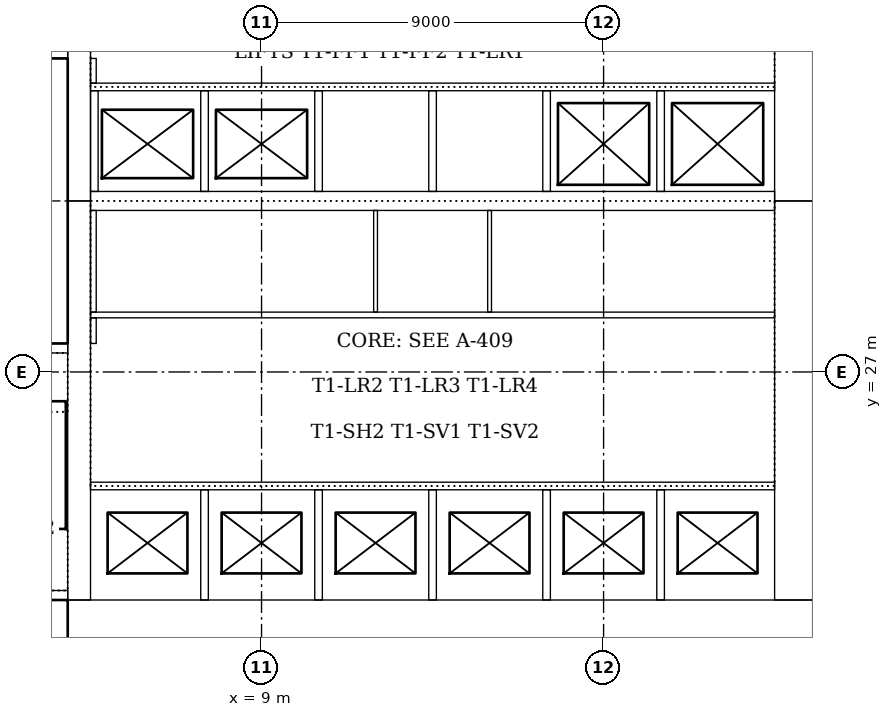
"""IFC4 building model, lengths in metres.
Left out: names, types, materials, properties, quantities, classifications, styles, units other than length and angle.
Written with IfcOpenShell. Run it as: python <this file> out.ifc"""

import sys

from ifc_helpers import new_model, si_unit, direction, frame, frame_2d, origin, place, context, subcontext, project, spatial, rectangle, extrude, element, fill, save


model = new_model("IFC4")
c1 = context("Model", 3, precision=1e-05, world=origin(), true_north=direction((0.0, 1.0)))
c2 = subcontext(c1, "Body", "Model", "MODEL_VIEW")
j1 = project(units=[si_unit("LENGTHUNIT", "METRE"), si_unit("PLANEANGLEUNIT", "RADIAN")], contexts=[c1])
p1 = place(None, origin())
s1 = spatial("IfcSite", under=j1, at=p1, CompositionType="ELEMENT")
p2 = place(p1, origin())
s2 = spatial("IfcBuilding", under=s1, at=p2, CompositionType="ELEMENT")
p3 = place(p2, frame((0.0, 0.0, 26.0)))
s3 = spatial("IfcBuildingStorey", under=s2, at=p3, CompositionType="ELEMENT", Elevation=26.0)
p4 = place(p3, frame((3.9, 20.5, 0.0), z_axis=(0.0, 0.0, 1.0), x_axis=(1.0, 0.0, 0.0)))
e1 = element("IfcWall", 1, at=p4, inside=s3, PredefinedType="SOLIDWALL", context=c2, shape_type="SweptSolid", body=[
    extrude(rectangle(XDim=19.6, YDim=1.0, at=frame_2d((9.8, 0.0))), origin(), (0.0, 0.0, 1.0), 4.0),
])
p5 = place(p3, frame((23.0, 21.0, 0.0), z_axis=(0.0, 0.0, 1.0), x_axis=(0.0, 1.0, 0.0)))
e2 = element("IfcWall", 2, at=p5, inside=s3, PredefinedType="SOLIDWALL", context=c2, shape_type="SweptSolid", body=[
    extrude(rectangle(XDim=10.5, YDim=1.0, at=frame_2d((5.25, 0.0))), origin(), (0.0, 0.0, 1.0), 4.0),
])
p6 = place(p5, frame((4.35, 0.0, 0.0)))
e3 = element("IfcOpeningElement", 3, at=p6, cuts=e2, PredefinedType="OPENING", context=c2, shape_type="SweptSolid", body=[
    extrude(rectangle(XDim=1.8, YDim=2.1, at=frame_2d((0.9, 1.05))), frame((0.0, 0.51, 0.0), z_axis=(0.0, -1.0, 0.0), x_axis=(1.0, 0.0, 0.0)), (0.0, 0.0, 1.0), 1.02),
])
p7 = place(p3, frame((23.0, 31.5, 0.0), z_axis=(0.0, 0.0, 1.0), x_axis=(0.0, 1.0, 0.0)))
e4 = element("IfcWall", 4, at=p7, inside=s3, PredefinedType="SOLIDWALL", context=c2, shape_type="SweptSolid", body=[
    extrude(rectangle(XDim=10.5, YDim=1.0, at=frame_2d((5.25, 0.0))), origin(), (0.0, 0.0, 1.0), 4.0),
])
p8 = place(p7, frame((3.15, 0.0, 0.0)))
e5 = element("IfcOpeningElement", 5, at=p8, cuts=e4, PredefinedType="OPENING", context=c2, shape_type="SweptSolid", body=[
    extrude(rectangle(XDim=1.0, YDim=2.1, at=frame_2d((0.5, 1.05))), frame((0.0, 0.51, 0.0), z_axis=(0.0, -1.0, 0.0), x_axis=(1.0, 0.0, 0.0)), (0.0, 0.0, 1.0), 1.02),
])
p9 = place(p7, frame((5.2, 0.0, 0.0)))
e6 = element("IfcOpeningElement", 6, at=p9, cuts=e4, PredefinedType="OPENING", context=c2, shape_type="SweptSolid", body=[
    extrude(rectangle(XDim=1.0, YDim=2.1, at=frame_2d((0.5, 1.05))), frame((0.0, 0.51, 0.0), z_axis=(0.0, -1.0, 0.0), x_axis=(1.0, 0.0, 0.0)), (0.0, 0.0, 1.0), 1.02),
])
p10 = place(p3, frame((4.2, 42.0, 0.0), z_axis=(0.0, 0.0, 1.0), x_axis=(0.0, -1.0, 0.0)))
e7 = element("IfcWall", 7, at=p10, inside=s3, PredefinedType="SOLIDWALL", context=c2, shape_type="SweptSolid", body=[
    extrude(rectangle(XDim=10.5, YDim=0.6, at=frame_2d((5.25, 0.0))), origin(), (0.0, 0.0, 1.0), 4.0),
])
p11 = place(p10, frame((5.3, 0.0, 0.0)))
e8 = element("IfcOpeningElement", 8, at=p11, cuts=e7, PredefinedType="OPENING", context=c2, shape_type="SweptSolid", body=[
    extrude(rectangle(XDim=1.0, YDim=2.1, at=frame_2d((0.5, 1.05))), frame((0.0, 0.31, 0.0), z_axis=(0.0, -1.0, 0.0), x_axis=(1.0, 0.0, 0.0)), (0.0, 0.0, 1.0), 0.62),
])
p12 = place(p3, frame((4.2, 31.5, 0.0), z_axis=(0.0, 0.0, 1.0), x_axis=(0.0, -1.0, 0.0)))
e9 = element("IfcWall", 9, at=p12, inside=s3, PredefinedType="SOLIDWALL", context=c2, shape_type="SweptSolid", body=[
    extrude(rectangle(XDim=10.5, YDim=0.6, at=frame_2d((5.25, 0.0))), origin(), (0.0, 0.0, 1.0), 4.0),
])
p13 = place(p12, frame((4.25, 0.0, 0.0)))
e10 = element("IfcOpeningElement", 10, at=p13, cuts=e9, PredefinedType="OPENING", context=c2, shape_type="SweptSolid", body=[
    extrude(rectangle(XDim=1.0, YDim=2.1, at=frame_2d((0.5, 1.05))), frame((0.0, 0.31, 0.0), z_axis=(0.0, -1.0, 0.0), x_axis=(1.0, 0.0, 0.0)), (0.0, 0.0, 1.0), 0.62),
])
p14 = place(p3, frame((4.5, 31.5, 0.0), z_axis=(0.0, 0.0, 1.0), x_axis=(1.0, 0.0, 0.0)))
e11 = element("IfcWall", 11, at=p14, inside=s3, PredefinedType="SOLIDWALL", context=c2, shape_type="SweptSolid", body=[
    extrude(rectangle(XDim=18.0, YDim=0.5, at=frame_2d((9.0, 0.0))), origin(), (0.0, 0.0, 1.0), 4.0),
])
p15 = place(p3, frame((0.36, 21.125, 0.0), z_axis=(0.0, 0.0, 1.0), x_axis=(1.0, 0.0, 0.0)))
e12 = element("IfcWall", 12, at=p15, inside=s3, PredefinedType="SOLIDWALL", context=c2, shape_type="SweptSolid", body=[
    extrude(rectangle(XDim=3.54, YDim=0.25, at=frame_2d((1.77, 0.0))), origin(), (0.0, 0.0, 1.0), 4.0),
])
p16 = place(p3, frame((3.9, 27.625, 0.0), z_axis=(0.0, 0.0, 1.0), x_axis=(-1.0, 0.0, 0.0)))
e13 = element("IfcWall", 13, at=p16, inside=s3, PredefinedType="SOLIDWALL", context=c2, shape_type="SweptSolid", body=[
    extrude(rectangle(XDim=3.54, YDim=0.25, at=frame_2d((1.77, 0.0))), origin(), (0.0, 0.0, 1.0), 4.0),
])
p17 = place(p16, frame((0.4, 0.0, 0.0)))
e14 = element("IfcOpeningElement", 14, at=p17, cuts=e13, PredefinedType="OPENING", context=c2, shape_type="SweptSolid", body=[
    extrude(rectangle(XDim=1.0, YDim=2.1, at=frame_2d((0.5, 1.05))), frame((0.0, 0.135, 0.0), z_axis=(0.0, -1.0, 0.0), x_axis=(1.0, 0.0, 0.0)), (0.0, 0.0, 1.0), 0.27),
])
p18 = place(p3, frame((0.36, 35.375, 0.0), z_axis=(0.0, 0.0, 1.0), x_axis=(1.0, 0.0, 0.0)))
e15 = element("IfcWall", 15, at=p18, inside=s3, PredefinedType="SOLIDWALL", context=c2, shape_type="SweptSolid", body=[
    extrude(rectangle(XDim=3.54, YDim=0.25, at=frame_2d((1.77, 0.0))), origin(), (0.0, 0.0, 1.0), 4.0),
])
p19 = place(p18, frame((2.14, 0.0, 0.0)))
e16 = element("IfcOpeningElement", 16, at=p19, cuts=e15, PredefinedType="OPENING", context=c2, shape_type="SweptSolid", body=[
    extrude(rectangle(XDim=1.0, YDim=2.1, at=frame_2d((0.5, 1.05))), frame((0.0, 0.135, 0.0), z_axis=(0.0, -1.0, 0.0), x_axis=(1.0, 0.0, 0.0)), (0.0, 0.0, 1.0), 0.27),
])
p20 = place(p3, frame((4.5, 24.0, 0.0), z_axis=(0.0, 0.0, 1.0), x_axis=(1.0, 0.0, 0.0)))
e17 = element("IfcWall", 17, at=p20, inside=s3, PredefinedType="PARTITIONING", context=c2, shape_type="SweptSolid", body=[
    extrude(rectangle(XDim=18.0, YDim=0.2, at=frame_2d((9.0, 0.0))), origin(), (0.0, 0.0, 1.0), 3.85),
])
p21 = place(p20, frame((0.95, 0.0, 0.0)))
e18 = element("IfcOpeningElement", 18, at=p21, cuts=e17, PredefinedType="OPENING", context=c2, shape_type="SweptSolid", body=[
    extrude(rectangle(XDim=1.1, YDim=2.1, at=frame_2d((0.55, 1.05))), frame((0.0, 0.11, 0.0), z_axis=(0.0, -1.0, 0.0), x_axis=(1.0, 0.0, 0.0)), (0.0, 0.0, 1.0), 0.22),
])
p22 = place(p20, frame((3.95, 0.0, 0.0)))
e19 = element("IfcOpeningElement", 19, at=p22, cuts=e17, PredefinedType="OPENING", context=c2, shape_type="SweptSolid", body=[
    extrude(rectangle(XDim=1.1, YDim=2.1, at=frame_2d((0.55, 1.05))), frame((0.0, 0.11, 0.0), z_axis=(0.0, -1.0, 0.0), x_axis=(1.0, 0.0, 0.0)), (0.0, 0.0, 1.0), 0.22),
])
p23 = place(p20, frame((6.95, 0.0, 0.0)))
e20 = element("IfcOpeningElement", 20, at=p23, cuts=e17, PredefinedType="OPENING", context=c2, shape_type="SweptSolid", body=[
    extrude(rectangle(XDim=1.1, YDim=2.1, at=frame_2d((0.55, 1.05))), frame((0.0, 0.11, 0.0), z_axis=(0.0, -1.0, 0.0), x_axis=(1.0, 0.0, 0.0)), (0.0, 0.0, 1.0), 0.22),
])
p24 = place(p20, frame((9.95, 0.0, 0.0)))
e21 = element("IfcOpeningElement", 21, at=p24, cuts=e17, PredefinedType="OPENING", context=c2, shape_type="SweptSolid", body=[
    extrude(rectangle(XDim=1.1, YDim=2.1, at=frame_2d((0.55, 1.05))), frame((0.0, 0.11, 0.0), z_axis=(0.0, -1.0, 0.0), x_axis=(1.0, 0.0, 0.0)), (0.0, 0.0, 1.0), 0.22),
])
p25 = place(p20, frame((12.95, 0.0, 0.0)))
e22 = element("IfcOpeningElement", 22, at=p25, cuts=e17, PredefinedType="OPENING", context=c2, shape_type="SweptSolid", body=[
    extrude(rectangle(XDim=1.1, YDim=2.1, at=frame_2d((0.55, 1.05))), frame((0.0, 0.11, 0.0), z_axis=(0.0, -1.0, 0.0), x_axis=(1.0, 0.0, 0.0)), (0.0, 0.0, 1.0), 0.22),
])
p26 = place(p20, frame((15.95, 0.0, 0.0)))
e23 = element("IfcOpeningElement", 23, at=p26, cuts=e17, PredefinedType="OPENING", context=c2, shape_type="SweptSolid", body=[
    extrude(rectangle(XDim=1.1, YDim=2.1, at=frame_2d((0.55, 1.05))), frame((0.0, 0.11, 0.0), z_axis=(0.0, -1.0, 0.0), x_axis=(1.0, 0.0, 0.0)), (0.0, 0.0, 1.0), 0.22),
])
p27 = place(p3, frame((4.5, 34.5, 0.0), z_axis=(0.0, 0.0, 1.0), x_axis=(1.0, 0.0, 0.0)))
e24 = element("IfcWall", 24, at=p27, inside=s3, PredefinedType="PARTITIONING", context=c2, shape_type="SweptSolid", body=[
    extrude(rectangle(XDim=18.0, YDim=0.2, at=frame_2d((9.0, 0.0))), origin(), (0.0, 0.0, 1.0), 3.85),
])
p28 = place(p27, frame((0.95, 0.0, 0.0)))
e25 = element("IfcOpeningElement", 25, at=p28, cuts=e24, PredefinedType="OPENING", context=c2, shape_type="SweptSolid", body=[
    extrude(rectangle(XDim=1.1, YDim=2.1, at=frame_2d((0.55, 1.05))), frame((0.0, 0.11, 0.0), z_axis=(0.0, -1.0, 0.0), x_axis=(1.0, 0.0, 0.0)), (0.0, 0.0, 1.0), 0.22),
])
p29 = place(p27, frame((3.95, 0.0, 0.0)))
e26 = element("IfcOpeningElement", 26, at=p29, cuts=e24, PredefinedType="OPENING", context=c2, shape_type="SweptSolid", body=[
    extrude(rectangle(XDim=1.1, YDim=2.1, at=frame_2d((0.55, 1.05))), frame((0.0, 0.11, 0.0), z_axis=(0.0, -1.0, 0.0), x_axis=(1.0, 0.0, 0.0)), (0.0, 0.0, 1.0), 0.22),
])
p30 = place(p27, frame((12.95, 0.0, 0.0)))
e27 = element("IfcOpeningElement", 27, at=p30, cuts=e24, PredefinedType="OPENING", context=c2, shape_type="SweptSolid", body=[
    extrude(rectangle(XDim=1.1, YDim=2.1, at=frame_2d((0.55, 1.05))), frame((0.0, 0.11, 0.0), z_axis=(0.0, -1.0, 0.0), x_axis=(1.0, 0.0, 0.0)), (0.0, 0.0, 1.0), 0.22),
])
p31 = place(p27, frame((15.95, 0.0, 0.0)))
e28 = element("IfcOpeningElement", 28, at=p31, cuts=e24, PredefinedType="OPENING", context=c2, shape_type="SweptSolid", body=[
    extrude(rectangle(XDim=1.1, YDim=2.1, at=frame_2d((0.55, 1.05))), frame((0.0, 0.11, 0.0), z_axis=(0.0, -1.0, 0.0), x_axis=(1.0, 0.0, 0.0)), (0.0, 0.0, 1.0), 0.22),
])
p32 = place(p3, frame((4.6, 31.75, 0.0), z_axis=(0.0, 0.0, 1.0), x_axis=(0.0, 1.0, 0.0)))
e29 = element("IfcWall", 29, at=p32, inside=s3, PredefinedType="PARTITIONING", context=c2, shape_type="SweptSolid", body=[
    extrude(rectangle(XDim=2.65, YDim=0.2, at=frame_2d((1.325, 0.0))), origin(), (0.0, 0.0, 1.0), 3.85),
])
p33 = place(p3, frame((7.5, 21.0, 0.0), z_axis=(0.0, 0.0, 1.0), x_axis=(0.0, 1.0, 0.0)))
e30 = element("IfcWall", 30, at=p33, inside=s3, PredefinedType="PARTITIONING", context=c2, shape_type="SweptSolid", body=[
    extrude(rectangle(XDim=2.9, YDim=0.2, at=frame_2d((1.45, 0.0))), origin(), (0.0, 0.0, 1.0), 3.85),
])
p34 = place(p3, frame((7.5, 31.75, 0.0), z_axis=(0.0, 0.0, 1.0), x_axis=(0.0, 1.0, 0.0)))
e31 = element("IfcWall", 31, at=p34, inside=s3, PredefinedType="PARTITIONING", context=c2, shape_type="SweptSolid", body=[
    extrude(rectangle(XDim=2.65, YDim=0.2, at=frame_2d((1.325, 0.0))), origin(), (0.0, 0.0, 1.0), 3.85),
])
p35 = place(p3, frame((10.5, 21.0, 0.0), z_axis=(0.0, 0.0, 1.0), x_axis=(0.0, 1.0, 0.0)))
e32 = element("IfcWall", 32, at=p35, inside=s3, PredefinedType="PARTITIONING", context=c2, shape_type="SweptSolid", body=[
    extrude(rectangle(XDim=2.9, YDim=0.2, at=frame_2d((1.45, 0.0))), origin(), (0.0, 0.0, 1.0), 3.85),
])
p36 = place(p3, frame((10.5, 31.75, 0.0), z_axis=(0.0, 0.0, 1.0), x_axis=(0.0, 1.0, 0.0)))
e33 = element("IfcWall", 33, at=p36, inside=s3, PredefinedType="PARTITIONING", context=c2, shape_type="SweptSolid", body=[
    extrude(rectangle(XDim=2.65, YDim=0.2, at=frame_2d((1.325, 0.0))), origin(), (0.0, 0.0, 1.0), 3.85),
])
p37 = place(p3, frame((13.5, 21.0, 0.0), z_axis=(0.0, 0.0, 1.0), x_axis=(0.0, 1.0, 0.0)))
e34 = element("IfcWall", 34, at=p37, inside=s3, PredefinedType="PARTITIONING", context=c2, shape_type="SweptSolid", body=[
    extrude(rectangle(XDim=2.9, YDim=0.2, at=frame_2d((1.45, 0.0))), origin(), (0.0, 0.0, 1.0), 3.85),
])
p38 = place(p3, frame((13.5, 31.75, 0.0), z_axis=(0.0, 0.0, 1.0), x_axis=(0.0, 1.0, 0.0)))
e35 = element("IfcWall", 35, at=p38, inside=s3, PredefinedType="PARTITIONING", context=c2, shape_type="SweptSolid", body=[
    extrude(rectangle(XDim=2.65, YDim=0.2, at=frame_2d((1.325, 0.0))), origin(), (0.0, 0.0, 1.0), 3.85),
])
p39 = place(p3, frame((16.5, 21.0, 0.0), z_axis=(0.0, 0.0, 1.0), x_axis=(0.0, 1.0, 0.0)))
e36 = element("IfcWall", 36, at=p39, inside=s3, PredefinedType="PARTITIONING", context=c2, shape_type="SweptSolid", body=[
    extrude(rectangle(XDim=2.9, YDim=0.2, at=frame_2d((1.45, 0.0))), origin(), (0.0, 0.0, 1.0), 3.85),
])
p40 = place(p3, frame((16.5, 31.75, 0.0), z_axis=(0.0, 0.0, 1.0), x_axis=(0.0, 1.0, 0.0)))
e37 = element("IfcWall", 37, at=p40, inside=s3, PredefinedType="PARTITIONING", context=c2, shape_type="SweptSolid", body=[
    extrude(rectangle(XDim=2.65, YDim=0.2, at=frame_2d((1.325, 0.0))), origin(), (0.0, 0.0, 1.0), 3.85),
])
p41 = place(p3, frame((19.5, 21.0, 0.0), z_axis=(0.0, 0.0, 1.0), x_axis=(0.0, 1.0, 0.0)))
e38 = element("IfcWall", 38, at=p41, inside=s3, PredefinedType="PARTITIONING", context=c2, shape_type="SweptSolid", body=[
    extrude(rectangle(XDim=2.9, YDim=0.2, at=frame_2d((1.45, 0.0))), origin(), (0.0, 0.0, 1.0), 3.85),
])
p42 = place(p3, frame((19.5, 31.75, 0.0), z_axis=(0.0, 0.0, 1.0), x_axis=(0.0, 1.0, 0.0)))
e39 = element("IfcWall", 39, at=p42, inside=s3, PredefinedType="PARTITIONING", context=c2, shape_type="SweptSolid", body=[
    extrude(rectangle(XDim=2.65, YDim=0.2, at=frame_2d((1.325, 0.0))), origin(), (0.0, 0.0, 1.0), 3.85),
])
p43 = place(p3, frame((4.5, 28.5, 0.0), z_axis=(0.0, 0.0, 1.0), x_axis=(1.0, 0.0, 0.0)))
e40 = element("IfcWall", 40, at=p43, inside=s3, PredefinedType="PARTITIONING", context=c2, shape_type="SweptSolid", body=[
    extrude(rectangle(XDim=18.0, YDim=0.15, at=frame_2d((9.0, 0.0))), origin(), (0.0, 0.0, 1.0), 3.85),
])
p44 = place(p43, frame((3.35, 0.0, 0.0)))
e41 = element("IfcOpeningElement", 41, at=p44, cuts=e40, PredefinedType="OPENING", context=c2, shape_type="SweptSolid", body=[
    extrude(rectangle(XDim=0.9, YDim=2.1, at=frame_2d((0.45, 1.05))), frame((0.0, 0.085, 0.0), z_axis=(0.0, -1.0, 0.0), x_axis=(1.0, 0.0, 0.0)), (0.0, 0.0, 1.0), 0.17),
])
p45 = place(p43, frame((8.55, 0.0, 0.0)))
e42 = element("IfcOpeningElement", 42, at=p45, cuts=e40, PredefinedType="OPENING", context=c2, shape_type="SweptSolid", body=[
    extrude(rectangle(XDim=0.9, YDim=2.1, at=frame_2d((0.45, 1.05))), frame((0.0, 0.085, 0.0), z_axis=(0.0, -1.0, 0.0), x_axis=(1.0, 0.0, 0.0)), (0.0, 0.0, 1.0), 0.17),
])
p46 = place(p43, frame((13.7, 0.0, 0.0)))
e43 = element("IfcOpeningElement", 43, at=p46, cuts=e40, PredefinedType="OPENING", context=c2, shape_type="SweptSolid", body=[
    extrude(rectangle(XDim=0.9, YDim=2.1, at=frame_2d((0.45, 1.05))), frame((0.0, 0.085, 0.0), z_axis=(0.0, -1.0, 0.0), x_axis=(1.0, 0.0, 0.0)), (0.0, 0.0, 1.0), 0.17),
])
p47 = place(p3, frame((4.575, 27.75, 0.0), z_axis=(0.0, 0.0, 1.0), x_axis=(0.0, 1.0, 0.0)))
e44 = element("IfcWall", 44, at=p47, inside=s3, PredefinedType="PARTITIONING", context=c2, shape_type="SweptSolid", body=[
    extrude(rectangle(XDim=0.675, YDim=0.15, at=frame_2d((0.338, 0.0))), origin(), (0.0, 0.0, 1.0), 3.85),
])
p48 = place(p3, frame((4.575, 28.575, 0.0), z_axis=(0.0, 0.0, 1.0), x_axis=(0.0, 1.0, 0.0)))
e45 = element("IfcWall", 45, at=p48, inside=s3, PredefinedType="PARTITIONING", context=c2, shape_type="SweptSolid", body=[
    extrude(rectangle(XDim=2.675, YDim=0.15, at=frame_2d((1.337, 0.0))), origin(), (0.0, 0.0, 1.0), 3.85),
])
p49 = place(p3, frame((4.575, 34.6, 0.0), z_axis=(0.0, 0.0, 1.0), x_axis=(0.0, 1.0, 0.0)))
e46 = element("IfcWall", 46, at=p49, inside=s3, PredefinedType="PARTITIONING", context=c2, shape_type="SweptSolid", body=[
    extrude(rectangle(XDim=0.65, YDim=0.15, at=frame_2d((0.325, 0.0))), origin(), (0.0, 0.0, 1.0), 3.85),
])
for number, where, z_axis, x_axis in (
    (47, (12.0, 28.575, 0.0), (0.0, 0.0, 1.0), (0.0, 1.0, 0.0)),
    (48, (15.0, 28.575, 0.0), (0.0, 0.0, 1.0), (0.0, 1.0, 0.0)),
):
    element("IfcWall", number, at=place(p3, frame(where, z_axis=z_axis, x_axis=x_axis)), inside=s3, PredefinedType="PARTITIONING", context=c2, shape_type="SweptSolid", body=[
        extrude(rectangle(XDim=2.675, YDim=0.1, at=frame_2d((1.337, 0.0))), origin(), (0.0, 0.0, 1.0), 3.85),
    ])
p50 = place(p13, frame((1.0, 0.0, 0.0), z_axis=(0.0, 0.0, 1.0), x_axis=(-1.0, 0.0, 0.0)))
e49 = element("IfcDoor", 49, at=p50, inside=s3, OperationType="SINGLE_SWING_RIGHT", PredefinedType="DOOR", context=c2, shape_type="SweptSolid", body=[
    extrude(rectangle(XDim=1.0, YDim=2.1, at=frame_2d((0.5, 1.05))), frame((0.0, 0.025, 0.0), z_axis=(0.0, -1.0, 0.0), x_axis=(1.0, 0.0, 0.0)), (0.0, 0.0, 1.0), 0.05),
])
fill(e10, e49)
p51 = place(p21, origin())
e50 = element("IfcDoor", 50, at=p51, inside=s3, OperationType="SLIDING_TO_LEFT", PredefinedType="DOOR", context=c2, shape_type="SweptSolid", body=[
    extrude(rectangle(XDim=1.1, YDim=2.1, at=frame_2d((0.55, 1.05))), frame((0.0, 0.025, 0.0), z_axis=(0.0, -1.0, 0.0), x_axis=(1.0, 0.0, 0.0)), (0.0, 0.0, 1.0), 0.05),
])
fill(e18, e50)
p52 = place(p22, origin())
e51 = element("IfcDoor", 51, at=p52, inside=s3, OperationType="SLIDING_TO_LEFT", PredefinedType="DOOR", context=c2, shape_type="SweptSolid", body=[
    extrude(rectangle(XDim=1.1, YDim=2.1, at=frame_2d((0.55, 1.05))), frame((0.0, 0.025, 0.0), z_axis=(0.0, -1.0, 0.0), x_axis=(1.0, 0.0, 0.0)), (0.0, 0.0, 1.0), 0.05),
])
fill(e19, e51)
p53 = place(p23, origin())
e52 = element("IfcDoor", 52, at=p53, inside=s3, OperationType="SLIDING_TO_LEFT", PredefinedType="DOOR", context=c2, shape_type="SweptSolid", body=[
    extrude(rectangle(XDim=1.1, YDim=2.1, at=frame_2d((0.55, 1.05))), frame((0.0, 0.025, 0.0), z_axis=(0.0, -1.0, 0.0), x_axis=(1.0, 0.0, 0.0)), (0.0, 0.0, 1.0), 0.05),
])
fill(e20, e52)
p54 = place(p24, origin())
e53 = element("IfcDoor", 53, at=p54, inside=s3, OperationType="SLIDING_TO_LEFT", PredefinedType="DOOR", context=c2, shape_type="SweptSolid", body=[
    extrude(rectangle(XDim=1.1, YDim=2.1, at=frame_2d((0.55, 1.05))), frame((0.0, 0.025, 0.0), z_axis=(0.0, -1.0, 0.0), x_axis=(1.0, 0.0, 0.0)), (0.0, 0.0, 1.0), 0.05),
])
fill(e21, e53)
p55 = place(p25, origin())
e54 = element("IfcDoor", 54, at=p55, inside=s3, OperationType="SLIDING_TO_LEFT", PredefinedType="DOOR", context=c2, shape_type="SweptSolid", body=[
    extrude(rectangle(XDim=1.1, YDim=2.1, at=frame_2d((0.55, 1.05))), frame((0.0, 0.025, 0.0), z_axis=(0.0, -1.0, 0.0), x_axis=(1.0, 0.0, 0.0)), (0.0, 0.0, 1.0), 0.05),
])
fill(e22, e54)
p56 = place(p26, origin())
e55 = element("IfcDoor", 55, at=p56, inside=s3, OperationType="SLIDING_TO_LEFT", PredefinedType="DOOR", context=c2, shape_type="SweptSolid", body=[
    extrude(rectangle(XDim=1.1, YDim=2.1, at=frame_2d((0.55, 1.05))), frame((0.0, 0.025, 0.0), z_axis=(0.0, -1.0, 0.0), x_axis=(1.0, 0.0, 0.0)), (0.0, 0.0, 1.0), 0.05),
])
fill(e23, e55)
p57 = place(p28, origin())
e56 = element("IfcDoor", 56, at=p57, inside=s3, OperationType="SLIDING_TO_LEFT", PredefinedType="DOOR", context=c2, shape_type="SweptSolid", body=[
    extrude(rectangle(XDim=1.1, YDim=2.1, at=frame_2d((0.55, 1.05))), frame((0.0, 0.025, 0.0), z_axis=(0.0, -1.0, 0.0), x_axis=(1.0, 0.0, 0.0)), (0.0, 0.0, 1.0), 0.05),
])
fill(e25, e56)
p58 = place(p29, origin())
e57 = element("IfcDoor", 57, at=p58, inside=s3, OperationType="SLIDING_TO_LEFT", PredefinedType="DOOR", context=c2, shape_type="SweptSolid", body=[
    extrude(rectangle(XDim=1.1, YDim=2.1, at=frame_2d((0.55, 1.05))), frame((0.0, 0.025, 0.0), z_axis=(0.0, -1.0, 0.0), x_axis=(1.0, 0.0, 0.0)), (0.0, 0.0, 1.0), 0.05),
])
fill(e26, e57)
p59 = place(p30, origin())
e58 = element("IfcDoor", 58, at=p59, inside=s3, OperationType="SLIDING_TO_LEFT", PredefinedType="DOOR", context=c2, shape_type="SweptSolid", body=[
    extrude(rectangle(XDim=1.1, YDim=2.1, at=frame_2d((0.55, 1.05))), frame((0.0, 0.025, 0.0), z_axis=(0.0, -1.0, 0.0), x_axis=(1.0, 0.0, 0.0)), (0.0, 0.0, 1.0), 0.05),
])
fill(e27, e58)
p60 = place(p31, origin())
e59 = element("IfcDoor", 59, at=p60, inside=s3, OperationType="SLIDING_TO_LEFT", PredefinedType="DOOR", context=c2, shape_type="SweptSolid", body=[
    extrude(rectangle(XDim=1.1, YDim=2.1, at=frame_2d((0.55, 1.05))), frame((0.0, 0.025, 0.0), z_axis=(0.0, -1.0, 0.0), x_axis=(1.0, 0.0, 0.0)), (0.0, 0.0, 1.0), 0.05),
])
fill(e28, e59)
p61 = place(p6, origin())
e60 = element("IfcDoor", 60, at=p61, inside=s3, OperationType="DOUBLE_DOOR_DOUBLE_SWING", PredefinedType="DOOR", context=c2, shape_type="SweptSolid", body=[
    extrude(rectangle(XDim=1.8, YDim=2.1, at=frame_2d((0.9, 1.05))), frame((0.0, 0.025, 0.0), z_axis=(0.0, -1.0, 0.0), x_axis=(1.0, 0.0, 0.0)), (0.0, 0.0, 1.0), 0.05),
])
fill(e3, e60)
p62 = place(p8, origin())
e61 = element("IfcDoor", 61, at=p62, inside=s3, OperationType="SINGLE_SWING_RIGHT", PredefinedType="DOOR", context=c2, shape_type="SweptSolid", body=[
    extrude(rectangle(XDim=1.0, YDim=2.1, at=frame_2d((0.5, 1.05))), frame((0.0, 0.025, 0.0), z_axis=(0.0, -1.0, 0.0), x_axis=(1.0, 0.0, 0.0)), (0.0, 0.0, 1.0), 0.05),
])
fill(e5, e61)
p63 = place(p44, origin())
e62 = element("IfcDoor", 62, at=p63, inside=s3, OperationType="SINGLE_SWING_RIGHT", PredefinedType="DOOR", context=c2, shape_type="SweptSolid", body=[
    extrude(rectangle(XDim=0.9, YDim=2.1, at=frame_2d((0.45, 1.05))), frame((0.0, 0.025, 0.0), z_axis=(0.0, -1.0, 0.0), x_axis=(1.0, 0.0, 0.0)), (0.0, 0.0, 1.0), 0.05),
])
fill(e41, e62)
p64 = place(p45, origin())
e63 = element("IfcDoor", 63, at=p64, inside=s3, OperationType="SINGLE_SWING_RIGHT", PredefinedType="DOOR", context=c2, shape_type="SweptSolid", body=[
    extrude(rectangle(XDim=0.9, YDim=2.1, at=frame_2d((0.45, 1.05))), frame((0.0, 0.025, 0.0), z_axis=(0.0, -1.0, 0.0), x_axis=(1.0, 0.0, 0.0)), (0.0, 0.0, 1.0), 0.05),
])
fill(e42, e63)
p65 = place(p46, origin())
e64 = element("IfcDoor", 64, at=p65, inside=s3, OperationType="SINGLE_SWING_RIGHT", PredefinedType="DOOR", context=c2, shape_type="SweptSolid", body=[
    extrude(rectangle(XDim=0.9, YDim=2.1, at=frame_2d((0.45, 1.05))), frame((0.0, 0.025, 0.0), z_axis=(0.0, -1.0, 0.0), x_axis=(1.0, 0.0, 0.0)), (0.0, 0.0, 1.0), 0.05),
])
fill(e43, e64)
save(model, sys.argv[1])
